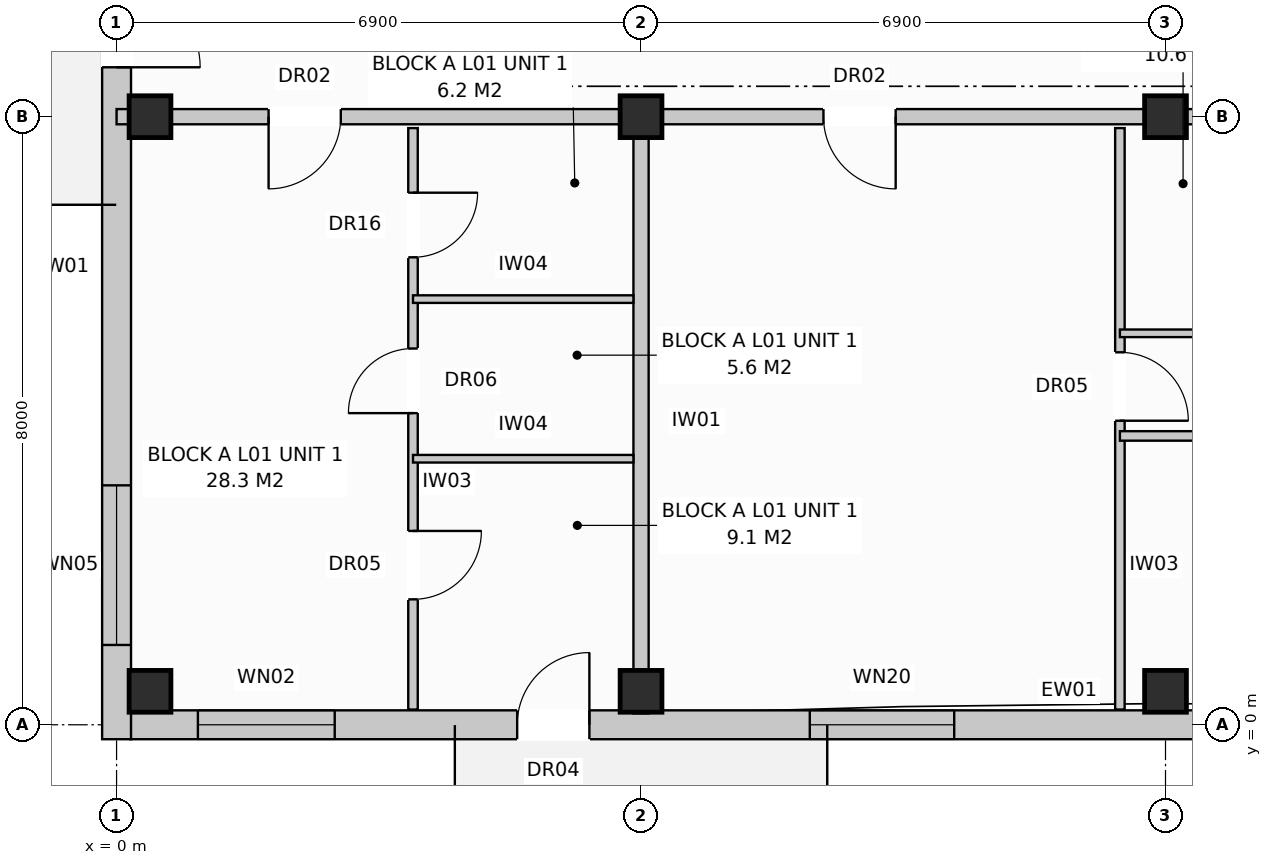
"""IFC4 building model, lengths in metres.
Left out: names, types, materials, properties, quantities, classifications, styles, units other than length and angle.
Written with IfcOpenShell. Run it as: python <this file> out.ifc"""

import sys

from ifc_helpers import new_model, si_unit, direction, frame, frame_2d, origin, origin_with_axes, origin_2d, place, context, subcontext, project, spatial, rectangle, extrude, element, fill, save


model = new_model("IFC4")
c1 = context("Model", 3, precision=1e-05, world=origin(), true_north=direction((0.0, 1.0)))
c2 = subcontext(c1, "Body", "Model", "MODEL_VIEW")
j1 = project(units=[si_unit("LENGTHUNIT", "METRE"), si_unit("PLANEANGLEUNIT", "RADIAN")], contexts=[c1])
p1 = place(None, origin())
s1 = spatial("IfcSite", under=j1, at=p1, CompositionType="ELEMENT")
p2 = place(p1, origin())
s2 = spatial("IfcBuilding", under=s1, at=p2, CompositionType="ELEMENT")
p3 = place(p2, frame((0.0, 0.0, 4.4)))
s3 = spatial("IfcBuildingStorey", under=s2, at=p3, CompositionType="ELEMENT", Elevation=4.4)
for number, where, z_axis, x_axis in (
    (1, (0.44, 0.44, 0.0), (0.0, 0.0, 1.0), (1.0, 0.0, 0.0)),
    (2, (0.44, 8.0, 0.0), (0.0, 0.0, 1.0), (1.0, 0.0, 0.0)),
    (3, (6.9, 0.44, 0.0), (0.0, 0.0, 1.0), (1.0, 0.0, 0.0)),
    (4, (6.9, 8.0, 0.0), (0.0, 0.0, 1.0), (1.0, 0.0, 0.0)),
    (5, (13.8, 0.44, 0.0), (0.0, 0.0, 1.0), (1.0, 0.0, 0.0)),
    (6, (13.8, 8.0, 0.0), (0.0, 0.0, 1.0), (1.0, 0.0, 0.0)),
):
    element("IfcColumn", number, at=place(p3, frame(where, z_axis=z_axis, x_axis=x_axis)), inside=s3, PredefinedType="COLUMN", context=c2, shape_type="SweptSolid", body=[
        extrude(rectangle(XDim=0.55, YDim=0.55, at=origin_2d()), origin(), (0.0, 0.0, 1.0), 3.6),
    ])
p4 = place(p3, frame((0.18, 0.0, 0.0), z_axis=(0.0, 0.0, 1.0), x_axis=(1.0, 0.0, 0.0)))
e7 = element("IfcWall", 7, at=p4, inside=s3, PredefinedType="STANDARD", context=c2, shape_type="SweptSolid", body=[
    extrude(rectangle(XDim=54.84, YDim=0.38, at=frame_2d((27.42, 0.0))), origin(), (0.0, 0.0, 1.0), 3.33),
])
p5 = place(p4, frame((5.09, 0.0, 0.0)))
e8 = element("IfcOpeningElement", 8, at=p5, cuts=e7, PredefinedType="OPENING", context=c2, shape_type="SweptSolid", body=[
    extrude(rectangle(XDim=0.95, YDim=2.1, at=frame_2d((0.475, 1.05))), frame((0.0, 0.202, 0.0), z_axis=(0.0, -1.0, 0.0), x_axis=(1.0, 0.0, 0.0)), (0.0, 0.0, 1.0), 0.404),
])
p6 = place(p4, frame((18.89, 0.0, 0.0)))
e9 = element("IfcOpeningElement", 9, at=p6, cuts=e7, PredefinedType="OPENING", context=c2, shape_type="SweptSolid", body=[
    extrude(rectangle(XDim=0.95, YDim=2.1, at=frame_2d((0.475, 1.05))), frame((0.0, 0.202, 0.0), z_axis=(0.0, -1.0, 0.0), x_axis=(1.0, 0.0, 0.0)), (0.0, 0.0, 1.0), 0.404),
])
p7 = place(p4, frame((32.69, 0.0, 0.0)))
e10 = element("IfcOpeningElement", 10, at=p7, cuts=e7, PredefinedType="OPENING", context=c2, shape_type="SweptSolid", body=[
    extrude(rectangle(XDim=0.95, YDim=2.1, at=frame_2d((0.475, 1.05))), frame((0.0, 0.202, 0.0), z_axis=(0.0, -1.0, 0.0), x_axis=(1.0, 0.0, 0.0)), (0.0, 0.0, 1.0), 0.404),
])
p8 = place(p4, frame((46.507, 0.0, 0.0)))
e11 = element("IfcOpeningElement", 11, at=p8, cuts=e7, PredefinedType="OPENING", context=c2, shape_type="SweptSolid", body=[
    extrude(rectangle(XDim=0.95, YDim=2.1, at=frame_2d((0.475, 1.05))), frame((0.0, 0.202, 0.0), z_axis=(0.0, -1.0, 0.0), x_axis=(1.0, 0.0, 0.0)), (0.0, 0.0, 1.0), 0.404),
])
p9 = place(p4, frame((0.89, 0.0, 0.8)))
e12 = element("IfcOpeningElement", 12, at=p9, cuts=e7, PredefinedType="OPENING", context=c2, shape_type="SweptSolid", body=[
    extrude(rectangle(XDim=1.8, YDim=1.7, at=frame_2d((0.9, 0.85))), frame((0.0, 0.202, 0.0), z_axis=(0.0, -1.0, 0.0), x_axis=(1.0, 0.0, 0.0)), (0.0, 0.0, 1.0), 0.404),
])
p10 = place(p4, frame((8.94, 0.0, 0.8)))
e13 = element("IfcOpeningElement", 13, at=p10, cuts=e7, PredefinedType="OPENING", context=c2, shape_type="SweptSolid", body=[
    extrude(rectangle(XDim=1.9, YDim=1.85, at=frame_2d((0.95, 0.925))), frame((0.0, 0.202, 0.0), z_axis=(0.0, -1.0, 0.0), x_axis=(1.0, 0.0, 0.0)), (0.0, 0.0, 1.0), 0.404),
])
p11 = place(p4, frame((14.615, 0.0, 0.8)))
e14 = element("IfcOpeningElement", 14, at=p11, cuts=e7, PredefinedType="OPENING", context=c2, shape_type="SweptSolid", body=[
    extrude(rectangle(XDim=1.95, YDim=1.65, at=frame_2d((0.975, 0.825))), frame((0.0, 0.202, 0.0), z_axis=(0.0, -1.0, 0.0), x_axis=(1.0, 0.0, 0.0)), (0.0, 0.0, 1.0), 0.404),
])
p12 = place(p4, frame((21.09, 0.0, 0.8)))
e15 = element("IfcOpeningElement", 15, at=p12, cuts=e7, PredefinedType="OPENING", context=c2, shape_type="SweptSolid", body=[
    extrude(rectangle(XDim=1.8, YDim=1.7, at=frame_2d((0.9, 0.85))), frame((0.0, 0.202, 0.0), z_axis=(0.0, -1.0, 0.0), x_axis=(1.0, 0.0, 0.0)), (0.0, 0.0, 1.0), 0.404),
])
p13 = place(p4, frame((24.44, 0.0, 0.8)))
e16 = element("IfcOpeningElement", 16, at=p13, cuts=e7, PredefinedType="OPENING", context=c2, shape_type="SweptSolid", body=[
    extrude(rectangle(XDim=1.9, YDim=1.85, at=frame_2d((0.95, 0.925))), frame((0.0, 0.202, 0.0), z_axis=(0.0, -1.0, 0.0), x_axis=(1.0, 0.0, 0.0)), (0.0, 0.0, 1.0), 0.404),
])
p14 = place(p4, frame((28.415, 0.0, 0.8)))
e17 = element("IfcOpeningElement", 17, at=p14, cuts=e7, PredefinedType="OPENING", context=c2, shape_type="SweptSolid", body=[
    extrude(rectangle(XDim=1.95, YDim=1.65, at=frame_2d((0.975, 0.825))), frame((0.0, 0.202, 0.0), z_axis=(0.0, -1.0, 0.0), x_axis=(1.0, 0.0, 0.0)), (0.0, 0.0, 1.0), 0.404),
])
p15 = place(p4, frame((35.59, 0.0, 0.8)))
e18 = element("IfcOpeningElement", 18, at=p15, cuts=e7, PredefinedType="OPENING", context=c2, shape_type="SweptSolid", body=[
    extrude(rectangle(XDim=1.8, YDim=1.7, at=frame_2d((0.9, 0.85))), frame((0.0, 0.202, 0.0), z_axis=(0.0, -1.0, 0.0), x_axis=(1.0, 0.0, 0.0)), (0.0, 0.0, 1.0), 0.404),
])
p16 = place(p4, frame((38.83, 0.0, 0.8)))
e19 = element("IfcOpeningElement", 19, at=p16, cuts=e7, PredefinedType="OPENING", context=c2, shape_type="SweptSolid", body=[
    extrude(rectangle(XDim=1.55, YDim=1.55, at=frame_2d((0.775, 0.775))), frame((0.0, 0.202, 0.0), z_axis=(0.0, -1.0, 0.0), x_axis=(1.0, 0.0, 0.0)), (0.0, 0.0, 1.0), 0.404),
])
p17 = place(p4, frame((42.415, 0.0, 0.8)))
e20 = element("IfcOpeningElement", 20, at=p17, cuts=e7, PredefinedType="OPENING", context=c2, shape_type="SweptSolid", body=[
    extrude(rectangle(XDim=1.95, YDim=1.65, at=frame_2d((0.975, 0.825))), frame((0.0, 0.202, 0.0), z_axis=(0.0, -1.0, 0.0), x_axis=(1.0, 0.0, 0.0)), (0.0, 0.0, 1.0), 0.404),
])
p18 = place(p4, frame((48.69, 0.0, 0.9)))
e21 = element("IfcOpeningElement", 21, at=p18, cuts=e7, PredefinedType="OPENING", context=c2, shape_type="SweptSolid", body=[
    extrude(rectangle(XDim=0.95, YDim=1.55, at=frame_2d((0.475, 0.775))), frame((0.0, 0.202, 0.0), z_axis=(0.0, -1.0, 0.0), x_axis=(1.0, 0.0, 0.0)), (0.0, 0.0, 1.0), 0.404),
])
p19 = place(p4, frame((51.44, 0.0, 0.8)))
e22 = element("IfcOpeningElement", 22, at=p19, cuts=e7, PredefinedType="OPENING", context=c2, shape_type="SweptSolid", body=[
    extrude(rectangle(XDim=1.9, YDim=1.85, at=frame_2d((0.95, 0.925))), frame((0.0, 0.202, 0.0), z_axis=(0.0, -1.0, 0.0), x_axis=(1.0, 0.0, 0.0)), (0.0, 0.0, 1.0), 0.404),
])
p20 = place(p3, frame((0.0, -0.19, 0.0), z_axis=(0.0, 0.0, 1.0), x_axis=(0.0, 1.0, 0.0)))
e23 = element("IfcWall", 23, at=p20, inside=s3, PredefinedType="STANDARD", context=c2, shape_type="SweptSolid", body=[
    extrude(rectangle(XDim=18.78, YDim=0.38, at=frame_2d((9.39, 0.0))), origin(), (0.0, 0.0, 1.0), 3.33),
])
p21 = place(p20, frame((8.84, 0.0, 0.0)))
e24 = element("IfcOpeningElement", 24, at=p21, cuts=e23, PredefinedType="OPENING", context=c2, shape_type="SweptSolid", body=[
    extrude(rectangle(XDim=1.1, YDim=2.1, at=frame_2d((0.55, 1.05))), frame((0.0, 0.202, 0.0), z_axis=(0.0, -1.0, 0.0), x_axis=(1.0, 0.0, 0.0)), (0.0, 0.0, 1.0), 0.404),
])
p22 = place(p20, frame((1.24, 0.0, 0.72)))
e25 = element("IfcOpeningElement", 25, at=p22, cuts=e23, PredefinedType="OPENING", context=c2, shape_type="SweptSolid", body=[
    extrude(rectangle(XDim=2.1, YDim=1.9, at=frame_2d((1.05, 0.95))), frame((0.0, 0.202, 0.0), z_axis=(0.0, -1.0, 0.0), x_axis=(1.0, 0.0, 0.0)), (0.0, 0.0, 1.0), 0.404),
])
p23 = place(p20, frame((15.44, 0.0, 0.72)))
e26 = element("IfcOpeningElement", 26, at=p23, cuts=e23, PredefinedType="OPENING", context=c2, shape_type="SweptSolid", body=[
    extrude(rectangle(XDim=2.1, YDim=1.9, at=frame_2d((1.05, 0.95))), frame((0.0, 0.202, 0.0), z_axis=(0.0, -1.0, 0.0), x_axis=(1.0, 0.0, 0.0)), (0.0, 0.0, 1.0), 0.404),
])
p24 = place(p3, frame((6.9, 7.85, 0.0), z_axis=(0.0, 0.0, 1.0), x_axis=(0.0, -1.0, 0.0)))
e27 = element("IfcWall", 27, at=p24, inside=s3, PredefinedType="PARTITIONING", context=c2, shape_type="SweptSolid", body=[
    extrude(rectangle(XDim=7.7, YDim=0.2, at=frame_2d((3.85, 0.0))), origin(), (0.0, 0.0, 1.0), 2.77),
])
p25 = place(p3, frame((0.0, 8.0, 0.0), z_axis=(0.0, 0.0, 1.0), x_axis=(1.0, 0.0, 0.0)))
e28 = element("IfcWall", 28, at=p25, inside=s3, PredefinedType="PARTITIONING", context=c2, shape_type="SweptSolid", body=[
    extrude(rectangle(XDim=6.9, YDim=0.2, at=frame_2d((3.45, 0.0))), origin(), (0.0, 0.0, 1.0), 2.77),
])
p26 = place(p25, frame((2.0, 0.0, 0.0)))
e29 = element("IfcOpeningElement", 29, at=p26, cuts=e28, PredefinedType="OPENING", context=c2, shape_type="SweptSolid", body=[
    extrude(rectangle(XDim=0.95, YDim=2.15, at=frame_2d((0.475, 1.075))), frame((0.0, 0.112, 0.0), z_axis=(0.0, -1.0, 0.0), x_axis=(1.0, 0.0, 0.0)), (0.0, 0.0, 1.0), 0.224),
])
p27 = place(p3, frame((3.9, 7.85, 0.0), z_axis=(0.0, 0.0, 1.0), x_axis=(0.0, -1.0, 0.0)))
e30 = element("IfcWall", 30, at=p27, inside=s3, PredefinedType="PARTITIONING", context=c2, shape_type="SweptSolid", body=[
    extrude(rectangle(XDim=7.65, YDim=0.125, at=frame_2d((3.825, 0.0))), origin(), (0.0, 0.0, 1.0), 3.33),
])
p28 = place(p27, frame((0.85, 0.0, 0.0)))
e31 = element("IfcOpeningElement", 31, at=p28, cuts=e30, PredefinedType="OPENING", context=c2, shape_type="SweptSolid", body=[
    extrude(rectangle(XDim=0.85, YDim=2.1, at=frame_2d((0.425, 1.05))), frame((0.0, 0.074, 0.0), z_axis=(0.0, -1.0, 0.0), x_axis=(1.0, 0.0, 0.0)), (0.0, 0.0, 1.0), 0.149),
])
p29 = place(p27, frame((2.9, 0.0, 0.0)))
e32 = element("IfcOpeningElement", 32, at=p29, cuts=e30, PredefinedType="OPENING", context=c2, shape_type="SweptSolid", body=[
    extrude(rectangle(XDim=0.85, YDim=2.05, at=frame_2d((0.425, 1.025))), frame((0.0, 0.074, 0.0), z_axis=(0.0, -1.0, 0.0), x_axis=(1.0, 0.0, 0.0)), (0.0, 0.0, 1.0), 0.149),
])
p30 = place(p27, frame((5.3, 0.0, 0.0)))
e33 = element("IfcOpeningElement", 33, at=p30, cuts=e30, PredefinedType="OPENING", context=c2, shape_type="SweptSolid", body=[
    extrude(rectangle(XDim=0.9, YDim=2.1, at=frame_2d((0.45, 1.05))), frame((0.0, 0.074, 0.0), z_axis=(0.0, -1.0, 0.0), x_axis=(1.0, 0.0, 0.0)), (0.0, 0.0, 1.0), 0.149),
])
for number, where, z_axis, x_axis in (
    (34, (3.9, 5.6, 0.0), (0.0, 0.0, 1.0), (1.0, 0.0, 0.0)),
    (35, (3.9, 3.5, 0.0), (0.0, 0.0, 1.0), (1.0, 0.0, 0.0)),
):
    element("IfcWall", number, at=place(p3, frame(where, z_axis=z_axis, x_axis=x_axis)), inside=s3, PredefinedType="PARTITIONING", context=c2, shape_type="SweptSolid", body=[
        extrude(rectangle(XDim=2.9, YDim=0.1, at=frame_2d((1.45, 0.0))), origin(), (0.0, 0.0, 1.0), 3.33),
    ])
p31 = place(p3, frame((6.9, 8.0, 0.0), z_axis=(0.0, 0.0, 1.0), x_axis=(1.0, 0.0, 0.0)))
e36 = element("IfcWall", 36, at=p31, inside=s3, PredefinedType="PARTITIONING", context=c2, shape_type="SweptSolid", body=[
    extrude(rectangle(XDim=20.7, YDim=0.2, at=frame_2d((10.35, 0.0))), origin(), (0.0, 0.0, 1.0), 2.77),
])
p32 = place(p31, frame((2.4, 0.0, 0.0)))
e37 = element("IfcOpeningElement", 37, at=p32, cuts=e36, PredefinedType="OPENING", context=c2, shape_type="SweptSolid", body=[
    extrude(rectangle(XDim=0.95, YDim=2.15, at=frame_2d((0.475, 1.075))), frame((0.0, 0.112, 0.0), z_axis=(0.0, -1.0, 0.0), x_axis=(1.0, 0.0, 0.0)), (0.0, 0.0, 1.0), 0.224),
])
p33 = place(p3, frame((13.2, 7.85, 0.0), z_axis=(0.0, 0.0, 1.0), x_axis=(0.0, -1.0, 0.0)))
e38 = element("IfcWall", 38, at=p33, inside=s3, PredefinedType="PARTITIONING", context=c2, shape_type="SweptSolid", body=[
    extrude(rectangle(XDim=7.65, YDim=0.125, at=frame_2d((3.825, 0.0))), origin(), (0.0, 0.0, 1.0), 3.33),
])
p34 = place(p33, frame((2.95, 0.0, 0.0)))
e39 = element("IfcOpeningElement", 39, at=p34, cuts=e38, PredefinedType="OPENING", context=c2, shape_type="SweptSolid", body=[
    extrude(rectangle(XDim=0.9, YDim=2.1, at=frame_2d((0.45, 1.05))), frame((0.0, 0.074, 0.0), z_axis=(0.0, -1.0, 0.0), x_axis=(1.0, 0.0, 0.0)), (0.0, 0.0, 1.0), 0.149),
])
p35 = place(p3, frame((13.2, 5.15, 0.0), z_axis=(0.0, 0.0, 1.0), x_axis=(1.0, 0.0, 0.0)))
e40 = element("IfcWall", 40, at=p35, inside=s3, PredefinedType="PARTITIONING", context=c2, shape_type="SweptSolid", body=[
    extrude(rectangle(XDim=14.3, YDim=0.1, at=frame_2d((7.15, 0.0))), origin(), (0.0, 0.0, 1.0), 3.33),
])
p36 = place(p35, frame((1.6, 0.0, 0.0)))
e41 = element("IfcOpeningElement", 41, at=p36, cuts=e40, PredefinedType="OPENING", context=c2, shape_type="SweptSolid", body=[
    extrude(rectangle(XDim=0.9, YDim=2.1, at=frame_2d((0.45, 1.05))), frame((0.0, 0.062, 0.0), z_axis=(0.0, -1.0, 0.0), x_axis=(1.0, 0.0, 0.0)), (0.0, 0.0, 1.0), 0.124),
])
p37 = place(p35, frame((5.1, 0.0, 0.0)))
e42 = element("IfcOpeningElement", 42, at=p37, cuts=e40, PredefinedType="OPENING", context=c2, shape_type="SweptSolid", body=[
    extrude(rectangle(XDim=0.85, YDim=2.05, at=frame_2d((0.425, 1.025))), frame((0.0, 0.062, 0.0), z_axis=(0.0, -1.0, 0.0), x_axis=(1.0, 0.0, 0.0)), (0.0, 0.0, 1.0), 0.124),
])
p38 = place(p35, frame((8.2, 0.0, 0.0)))
e43 = element("IfcOpeningElement", 43, at=p38, cuts=e40, PredefinedType="OPENING", context=c2, shape_type="SweptSolid", body=[
    extrude(rectangle(XDim=0.85, YDim=2.05, at=frame_2d((0.425, 1.025))), frame((0.0, 0.062, 0.0), z_axis=(0.0, -1.0, 0.0), x_axis=(1.0, 0.0, 0.0)), (0.0, 0.0, 1.0), 0.124),
])
p39 = place(p35, frame((11.6, 0.0, 0.0)))
e44 = element("IfcOpeningElement", 44, at=p39, cuts=e40, PredefinedType="OPENING", context=c2, shape_type="SweptSolid", body=[
    extrude(rectangle(XDim=0.85, YDim=2.05, at=frame_2d((0.425, 1.025))), frame((0.0, 0.062, 0.0), z_axis=(0.0, -1.0, 0.0), x_axis=(1.0, 0.0, 0.0)), (0.0, 0.0, 1.0), 0.124),
])
p40 = place(p3, frame((13.2, 3.8, 0.0), z_axis=(0.0, 0.0, 1.0), x_axis=(1.0, 0.0, 0.0)))
e45 = element("IfcWall", 45, at=p40, inside=s3, PredefinedType="PARTITIONING", context=c2, shape_type="SweptSolid", body=[
    extrude(rectangle(XDim=10.4, YDim=0.125, at=frame_2d((5.2, 0.0))), origin(), (0.0, 0.0, 1.0), 3.33),
])
p41 = place(p40, frame((2.0, 0.0, 0.0)))
e46 = element("IfcOpeningElement", 46, at=p41, cuts=e45, PredefinedType="OPENING", context=c2, shape_type="SweptSolid", body=[
    extrude(rectangle(XDim=0.9, YDim=2.1, at=frame_2d((0.45, 1.05))), frame((0.0, 0.074, 0.0), z_axis=(0.0, -1.0, 0.0), x_axis=(1.0, 0.0, 0.0)), (0.0, 0.0, 1.0), 0.149),
])
p42 = place(p40, frame((7.2, 0.0, 0.0)))
e47 = element("IfcOpeningElement", 47, at=p42, cuts=e45, PredefinedType="OPENING", context=c2, shape_type="SweptSolid", body=[
    extrude(rectangle(XDim=0.9, YDim=2.1, at=frame_2d((0.45, 1.05))), frame((0.0, 0.074, 0.0), z_axis=(0.0, -1.0, 0.0), x_axis=(1.0, 0.0, 0.0)), (0.0, 0.0, 1.0), 0.149),
])
p43 = place(p5, origin_with_axes())
e48 = element("IfcDoor", 48, at=p43, inside=s3, OperationType="SINGLE_SWING_RIGHT", PredefinedType="DOOR", context=c2, shape_type="SweptSolid", body=[
    extrude(rectangle(XDim=0.95, YDim=2.1, at=frame_2d((0.475, 1.05))), frame((0.0, 0.025, 0.0), z_axis=(0.0, -1.0, 0.0), x_axis=(1.0, 0.0, 0.0)), (0.0, 0.0, 1.0), 0.05),
])
fill(e8, e48)
p44 = place(p9, origin_with_axes())
e49 = element("IfcWindow", 49, at=p44, inside=s3, PartitioningType="SINGLE_PANEL", PredefinedType="WINDOW", context=c2, shape_type="SweptSolid", body=[
    extrude(rectangle(XDim=1.8, YDim=1.7, at=frame_2d((0.9, 0.85))), frame((0.0, 0.03, 0.0), z_axis=(0.0, -1.0, 0.0), x_axis=(1.0, 0.0, 0.0)), (0.0, 0.0, 1.0), 0.06),
])
fill(e12, e49)
p45 = place(p10, origin_with_axes())
e50 = element("IfcWindow", 50, at=p45, inside=s3, PartitioningType="SINGLE_PANEL", PredefinedType="WINDOW", context=c2, shape_type="SweptSolid", body=[
    extrude(rectangle(XDim=1.9, YDim=1.85, at=frame_2d((0.95, 0.925))), frame((0.0, 0.03, 0.0), z_axis=(0.0, -1.0, 0.0), x_axis=(1.0, 0.0, 0.0)), (0.0, 0.0, 1.0), 0.06),
])
fill(e13, e50)
p46 = place(p21, frame((1.1, 0.0, 0.0), z_axis=(0.0, 0.0, 1.0), x_axis=(-1.0, 0.0, 0.0)))
e51 = element("IfcDoor", 51, at=p46, inside=s3, OperationType="SINGLE_SWING_LEFT", PredefinedType="DOOR", context=c2, shape_type="SweptSolid", body=[
    extrude(rectangle(XDim=1.1, YDim=2.1, at=frame_2d((0.55, 1.05))), frame((0.0, 0.025, 0.0), z_axis=(0.0, -1.0, 0.0), x_axis=(1.0, 0.0, 0.0)), (0.0, 0.0, 1.0), 0.05),
])
fill(e24, e51)
p47 = place(p22, origin_with_axes())
e52 = element("IfcWindow", 52, at=p47, inside=s3, PartitioningType="SINGLE_PANEL", PredefinedType="WINDOW", context=c2, shape_type="SweptSolid", body=[
    extrude(rectangle(XDim=2.1, YDim=1.9, at=frame_2d((1.05, 0.95))), frame((0.0, 0.03, 0.0), z_axis=(0.0, -1.0, 0.0), x_axis=(1.0, 0.0, 0.0)), (0.0, 0.0, 1.0), 0.06),
])
fill(e25, e52)
p48 = place(p26, frame((0.95, 0.0, 0.0), z_axis=(0.0, 0.0, 1.0), x_axis=(-1.0, 0.0, 0.0)))
e53 = element("IfcDoor", 53, at=p48, inside=s3, OperationType="SINGLE_SWING_LEFT", PredefinedType="DOOR", context=c2, shape_type="SweptSolid", body=[
    extrude(rectangle(XDim=0.95, YDim=2.15, at=frame_2d((0.475, 1.075))), frame((0.0, 0.025, 0.0), z_axis=(0.0, -1.0, 0.0), x_axis=(1.0, 0.0, 0.0)), (0.0, 0.0, 1.0), 0.05),
])
fill(e29, e53)
p49 = place(p28, origin_with_axes())
e54 = element("IfcDoor", 54, at=p49, inside=s3, OperationType="SINGLE_SWING_LEFT", PredefinedType="DOOR", context=c2, shape_type="SweptSolid", body=[
    extrude(rectangle(XDim=0.85, YDim=2.1, at=frame_2d((0.425, 1.05))), frame((0.0, 0.025, 0.0), z_axis=(0.0, -1.0, 0.0), x_axis=(1.0, 0.0, 0.0)), (0.0, 0.0, 1.0), 0.05),
])
fill(e31, e54)
p50 = place(p29, frame((0.85, 0.0, 0.0), z_axis=(0.0, 0.0, 1.0), x_axis=(-1.0, 0.0, 0.0)))
e55 = element("IfcDoor", 55, at=p50, inside=s3, OperationType="SINGLE_SWING_RIGHT", PredefinedType="DOOR", context=c2, shape_type="SweptSolid", body=[
    extrude(rectangle(XDim=0.85, YDim=2.05, at=frame_2d((0.425, 1.025))), frame((0.0, 0.025, 0.0), z_axis=(0.0, -1.0, 0.0), x_axis=(1.0, 0.0, 0.0)), (0.0, 0.0, 1.0), 0.05),
])
fill(e32, e55)
p51 = place(p30, origin_with_axes())
e56 = element("IfcDoor", 56, at=p51, inside=s3, OperationType="SINGLE_SWING_LEFT", PredefinedType="DOOR", context=c2, shape_type="SweptSolid", body=[
    extrude(rectangle(XDim=0.9, YDim=2.1, at=frame_2d((0.45, 1.05))), frame((0.0, 0.025, 0.0), z_axis=(0.0, -1.0, 0.0), x_axis=(1.0, 0.0, 0.0)), (0.0, 0.0, 1.0), 0.05),
])
fill(e33, e56)
p52 = place(p32, frame((0.95, 0.0, 0.0), z_axis=(0.0, 0.0, 1.0), x_axis=(-1.0, 0.0, 0.0)))
e57 = element("IfcDoor", 57, at=p52, inside=s3, OperationType="SINGLE_SWING_RIGHT", PredefinedType="DOOR", context=c2, shape_type="SweptSolid", body=[
    extrude(rectangle(XDim=0.95, YDim=2.15, at=frame_2d((0.475, 1.075))), frame((0.0, 0.025, 0.0), z_axis=(0.0, -1.0, 0.0), x_axis=(1.0, 0.0, 0.0)), (0.0, 0.0, 1.0), 0.05),
])
fill(e37, e57)
p53 = place(p34, origin_with_axes())
e58 = element("IfcDoor", 58, at=p53, inside=s3, OperationType="SINGLE_SWING_RIGHT", PredefinedType="DOOR", context=c2, shape_type="SweptSolid", body=[
    extrude(rectangle(XDim=0.9, YDim=2.1, at=frame_2d((0.45, 1.05))), frame((0.0, 0.025, 0.0), z_axis=(0.0, -1.0, 0.0), x_axis=(1.0, 0.0, 0.0)), (0.0, 0.0, 1.0), 0.05),
])
fill(e39, e58)
save(model, sys.argv[1])
